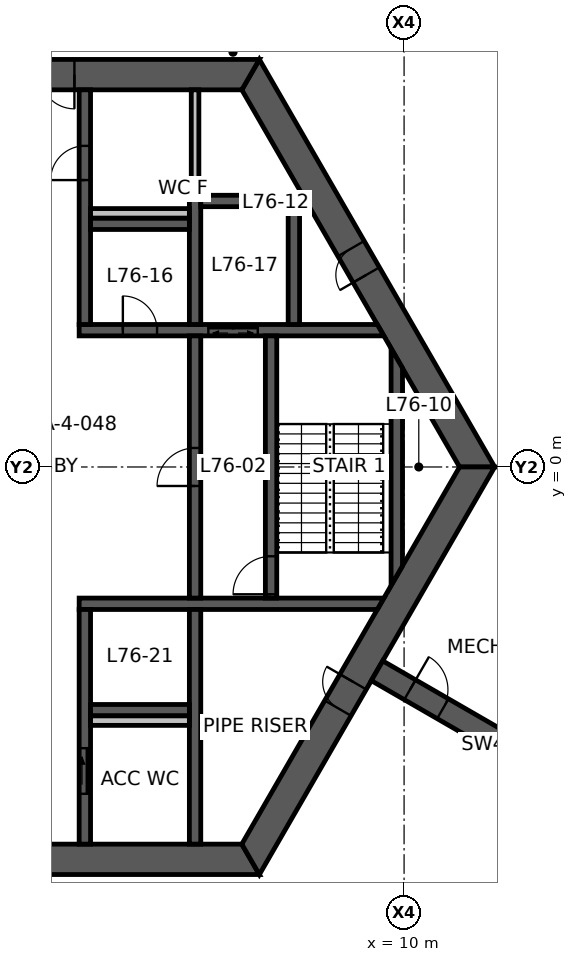
"""IFC4 building model, lengths in metres.
Left out: names, types, materials, properties, quantities, classifications, styles, units other than length and angle.
Written with IfcOpenShell. Run it as: python <this file> out.ifc"""

import sys

from ifc_helpers import new_model, si_unit, direction, frame, frame_2d, origin, place, context, subcontext, project, spatial, polyline, rectangle, outline, extrude, element, fill, save


model = new_model("IFC4")
c1 = context("Model", 3, precision=1e-05, world=origin(), true_north=direction((0.0, 1.0)))
c2 = subcontext(c1, "Body", "Model", "MODEL_VIEW")
j1 = project(units=[si_unit("LENGTHUNIT", "METRE"), si_unit("PLANEANGLEUNIT", "RADIAN")], contexts=[c1])
p1 = place(None, origin())
s1 = spatial("IfcSite", under=j1, at=p1, CompositionType="ELEMENT")
p2 = place(p1, origin())
s2 = spatial("IfcBuilding", under=s1, at=p2, CompositionType="ELEMENT")
p3 = place(p2, frame((0.0, 0.0, 302.5)))
s3 = spatial("IfcBuildingStorey", under=s2, at=p3, CompositionType="ELEMENT", Elevation=302.5)
p4 = place(p3, frame((11.922, 0.0, 0.0), z_axis=(0.0, 0.0, 1.0), x_axis=(-0.500004296715, 0.866022923061, 0.0)))
e1 = element("IfcWall", 1, at=p4, inside=s3, PredefinedType="SHEAR", context=c2, shape_type="SweptSolid", body=[
    extrude(outline(polyline([(-0.231, -0.4), (5.835, -0.4), (6.635, -0.4), (12.153, -0.4), (11.691, 0.4), (6.635, 0.4), (5.835, 0.4), (0.231, 0.4), (-0.231, -0.4)])), origin(), (0.0, 0.0, 1.0), 5.0),
])
p5 = place(p4, frame((5.835, 0.0, 0.0)))
e2 = element("IfcOpeningElement", 2, at=p5, cuts=e1, PredefinedType="OPENING", context=c2, shape_type="SweptSolid", body=[
    extrude(rectangle(XDim=0.8, YDim=2.1, at=frame_2d((0.4, 1.05))), frame((0.0, 0.41, 0.0), z_axis=(0.0, -1.0, 0.0), x_axis=(1.0, 0.0, 0.0)), (0.0, 0.0, 1.0), 0.82),
])
p6 = place(p3, frame((5.961, 10.325, 0.0), z_axis=(0.0, 0.0, 1.0), x_axis=(-1.0, 0.0, 0.0)))
e3 = element("IfcWall", 3, at=p6, inside=s3, PredefinedType="SHEAR", context=c2, shape_type="SweptSolid", body=[
    extrude(outline(polyline([(-0.231, -0.4), (4.636, -0.4), (5.536, -0.4), (6.386, -0.4), (7.286, -0.4), (12.153, -0.4), (11.691, 0.4), (7.286, 0.4), (6.386, 0.4), (5.536, 0.4), (4.636, 0.4), (0.231, 0.4), (-0.231, -0.4)])), origin(), (0.0, 0.0, 1.0), 5.0),
])
p7 = place(p6, frame((6.386, 0.0, 0.0)))
e4 = element("IfcOpeningElement", 4, at=p7, cuts=e3, PredefinedType="OPENING", context=c2, shape_type="SweptSolid", body=[
    extrude(rectangle(XDim=0.9, YDim=2.1, at=frame_2d((0.45, 1.05))), frame((0.0, 0.41, 0.0), z_axis=(0.0, -1.0, 0.0), x_axis=(1.0, 0.0, 0.0)), (0.0, 0.0, 1.0), 0.82),
])
p8 = place(p6, frame((4.636, 0.0, 0.0)))
e5 = element("IfcOpeningElement", 5, at=p8, cuts=e3, PredefinedType="OPENING", context=c2, shape_type="SweptSolid", body=[
    extrude(rectangle(XDim=0.9, YDim=2.1, at=frame_2d((0.45, 1.05))), frame((0.0, 0.41, 0.0), z_axis=(0.0, -1.0, 0.0), x_axis=(1.0, 0.0, 0.0)), (0.0, 0.0, 1.0), 0.82),
])
p9 = place(p3, frame((-5.961, -10.325, 0.0), z_axis=(0.0, 0.0, 1.0), x_axis=(1.0, 0.0, 0.0)))
e6 = element("IfcWall", 6, at=p9, inside=s3, PredefinedType="SHEAR", context=c2, shape_type="SweptSolid", body=[
    extrude(outline(polyline([(-0.231, -0.4), (5.461, -0.4), (6.461, -0.4), (12.153, -0.4), (11.691, 0.4), (6.461, 0.4), (5.461, 0.4), (0.231, 0.4), (-0.231, -0.4)])), origin(), (0.0, 0.0, 1.0), 5.0),
])
p10 = place(p9, frame((5.461, 0.0, 0.0)))
e7 = element("IfcOpeningElement", 7, at=p10, cuts=e6, PredefinedType="OPENING", context=c2, shape_type="SweptSolid", body=[
    extrude(rectangle(XDim=1.0, YDim=2.1, at=frame_2d((0.5, 1.05))), frame((0.0, 0.41, 0.0), z_axis=(0.0, -1.0, 0.0), x_axis=(1.0, 0.0, 0.0)), (0.0, 0.0, 1.0), 0.82),
])
p11 = place(p3, frame((5.961, -10.325, 0.0), z_axis=(0.0, 0.0, 1.0), x_axis=(0.500004296715, 0.866022923061, 0.0)))
e8 = element("IfcWall", 8, at=p11, inside=s3, PredefinedType="SHEAR", context=c2, shape_type="SweptSolid", body=[
    extrude(outline(polyline([(-0.231, -0.4), (4.594, -0.4), (5.394, -0.4), (12.153, -0.4), (11.691, 0.4), (5.394, 0.4), (4.594, 0.4), (0.231, 0.4), (-0.231, -0.4)])), origin(), (0.0, 0.0, 1.0), 5.0),
])
p12 = place(p11, frame((4.594, 0.0, 0.0)))
e9 = element("IfcOpeningElement", 9, at=p12, cuts=e8, PredefinedType="OPENING", context=c2, shape_type="SweptSolid", body=[
    extrude(rectangle(XDim=0.8, YDim=2.1, at=frame_2d((0.4, 1.05))), frame((0.0, 0.41, 0.0), z_axis=(0.0, -1.0, 0.0), x_axis=(1.0, 0.0, 0.0)), (0.0, 0.0, 1.0), 0.82),
])
p13 = place(p3, frame((9.288, -5.363, 0.0), z_axis=(0.0, 0.0, 1.0), x_axis=(0.866031736626, -0.499989031036, 0.0)))
e10 = element("IfcWall", 10, at=p13, inside=s3, PredefinedType="SHEAR", context=c2, shape_type="SweptSolid", body=[
    extrude(rectangle(XDim=7.796, YDim=0.6, at=frame_2d((3.898, 0.0))), origin(), (0.0, 0.0, 1.0), 5.0),
])
p14 = place(p13, frame((1.0, 0.0, 0.0)))
e11 = element("IfcOpeningElement", 11, at=p14, cuts=e10, PredefinedType="OPENING", context=c2, shape_type="SweptSolid", body=[
    extrude(rectangle(XDim=1.0, YDim=2.1, at=frame_2d((0.5, 1.05))), frame((0.0, 0.31, 0.0), z_axis=(0.0, -1.0, 0.0), x_axis=(1.0, 0.0, 0.0)), (0.0, 0.0, 1.0), 0.62),
])
p15 = place(p3, frame((20.389, 0.526, 0.0), z_axis=(0.0, 0.0, 1.0), x_axis=(-0.499993861681, 0.866028947716, 0.0)))
e12 = element("IfcWall", 12, at=p15, inside=s3, PredefinedType="ELEMENTEDWALL", context=c2, shape_type="SweptSolid", body=[
    extrude(rectangle(XDim=19.986, YDim=0.2, at=frame_2d((9.993, 0.0))), origin(), (0.0, 0.0, 1.0), 5.0),
])
p16 = place(p15, frame((0.9, 0.0, 0.4)))
e13 = element("IfcOpeningElement", 13, at=p16, cuts=e12, PredefinedType="OPENING", context=c2, shape_type="SweptSolid", body=[
    extrude(rectangle(XDim=2.531, YDim=4.2, at=frame_2d((1.266, 2.1))), frame((0.0, 0.11, 0.0), z_axis=(0.0, -1.0, 0.0), x_axis=(1.0, 0.0, 0.0)), (0.0, 0.0, 1.0), 0.22),
])
p17 = place(p15, frame((4.031, 0.0, 0.4)))
e14 = element("IfcOpeningElement", 14, at=p17, cuts=e12, PredefinedType="OPENING", context=c2, shape_type="SweptSolid", body=[
    extrude(rectangle(XDim=2.531, YDim=4.2, at=frame_2d((1.266, 2.1))), frame((0.0, 0.11, 0.0), z_axis=(0.0, -1.0, 0.0), x_axis=(1.0, 0.0, 0.0)), (0.0, 0.0, 1.0), 0.22),
])
p18 = place(p15, frame((13.424, 0.0, 0.4)))
e15 = element("IfcOpeningElement", 15, at=p18, cuts=e12, PredefinedType="OPENING", context=c2, shape_type="SweptSolid", body=[
    extrude(rectangle(XDim=2.531, YDim=4.2, at=frame_2d((1.266, 2.1))), frame((0.0, 0.11, 0.0), z_axis=(0.0, -1.0, 0.0), x_axis=(1.0, 0.0, 0.0)), (0.0, 0.0, 1.0), 0.22),
])
p19 = place(p15, frame((16.555, 0.0, 0.4)))
e16 = element("IfcOpeningElement", 16, at=p19, cuts=e12, PredefinedType="OPENING", context=c2, shape_type="SweptSolid", body=[
    extrude(rectangle(XDim=2.531, YDim=4.2, at=frame_2d((1.266, 2.1))), frame((0.0, 0.11, 0.0), z_axis=(0.0, -1.0, 0.0), x_axis=(1.0, 0.0, 0.0)), (0.0, 0.0, 1.0), 0.22),
])
p20 = place(p3, frame((1.45, 3.6, 0.0), z_axis=(0.0, 0.0, 1.0), x_axis=(1.0, 0.0, 0.0)))
e17 = element("IfcWall", 17, at=p20, inside=s3, PredefinedType="SHEAR", context=c2, shape_type="SweptSolid", body=[
    extrude(outline(polyline([(0.0, -0.15), (1.15, -0.15), (2.05, -0.15), (3.4, -0.15), (4.7, -0.15), (8.019, -0.15), (7.845, 0.15), (4.7, 0.15), (3.4, 0.15), (2.05, 0.15), (1.15, 0.15), (0.0, 0.15), (0.0, -0.15)])), origin(), (0.0, 0.0, 1.0), 5.0),
])
p21 = place(p20, frame((1.15, 0.0, 0.0)))
e18 = element("IfcOpeningElement", 18, at=p21, cuts=e17, PredefinedType="OPENING", context=c2, shape_type="SweptSolid", body=[
    extrude(rectangle(XDim=0.9, YDim=2.1, at=frame_2d((0.45, 1.05))), frame((0.0, 0.16, 0.0), z_axis=(0.0, -1.0, 0.0), x_axis=(1.0, 0.0, 0.0)), (0.0, 0.0, 1.0), 0.32),
])
p22 = place(p20, frame((3.4, 0.0, 0.0)))
e19 = element("IfcOpeningElement", 19, at=p22, cuts=e17, PredefinedType="OPENING", context=c2, shape_type="SweptSolid", body=[
    extrude(rectangle(XDim=1.3, YDim=2.1, at=frame_2d((0.65, 1.05))), frame((0.0, 0.16, 0.0), z_axis=(0.0, -1.0, 0.0), x_axis=(1.0, 0.0, 0.0)), (0.0, 0.0, 1.0), 0.32),
])
p23 = place(p3, frame((1.45, -3.6, 0.0), z_axis=(0.0, 0.0, 1.0), x_axis=(1.0, 0.0, 0.0)))
e20 = element("IfcWall", 20, at=p23, inside=s3, PredefinedType="SHEAR", context=c2, shape_type="SweptSolid", body=[
    extrude(outline(polyline([(0.0, -0.15), (7.845, -0.15), (8.019, 0.15), (0.0, 0.15), (0.0, -0.15)])), origin(), (0.0, 0.0, 1.0), 5.0),
])
p24 = place(p3, frame((1.6, 3.75, 0.0), z_axis=(0.0, 0.0, 1.0), x_axis=(0.0, 1.0, 0.0)))
e21 = element("IfcWall", 21, at=p24, inside=s3, PredefinedType="SHEAR", context=c2, shape_type="SweptSolid", body=[
    extrude(rectangle(XDim=6.175, YDim=0.3, at=frame_2d((3.087, 0.0))), origin(), (0.0, 0.0, 1.0), 5.0),
])
p25 = place(p24, frame((3.8, 0.0, 0.0)))
e22 = element("IfcOpeningElement", 22, at=p25, cuts=e21, PredefinedType="OPENING", context=c2, shape_type="SweptSolid", body=[
    extrude(rectangle(XDim=0.9, YDim=2.1, at=frame_2d((0.45, 1.05))), frame((0.0, 0.16, 0.0), z_axis=(0.0, -1.0, 0.0), x_axis=(1.0, 0.0, 0.0)), (0.0, 0.0, 1.0), 0.32),
])
p26 = place(p3, frame((1.6, -3.75, 0.0), z_axis=(0.0, 0.0, 1.0), x_axis=(0.0, -1.0, 0.0)))
e23 = element("IfcWall", 23, at=p26, inside=s3, PredefinedType="SHEAR", context=c2, shape_type="SweptSolid", body=[
    extrude(rectangle(XDim=6.175, YDim=0.3, at=frame_2d((3.087, 0.0))), origin(), (0.0, 0.0, 1.0), 5.0),
])
p27 = place(p26, frame((3.65, 0.0, 0.0)))
e24 = element("IfcOpeningElement", 24, at=p27, cuts=e23, PredefinedType="OPENING", context=c2, shape_type="SweptSolid", body=[
    extrude(rectangle(XDim=1.2, YDim=2.1, at=frame_2d((0.6, 1.05))), frame((0.0, 0.16, 0.0), z_axis=(0.0, -1.0, 0.0), x_axis=(1.0, 0.0, 0.0)), (0.0, 0.0, 1.0), 0.32),
])
p28 = place(p3, frame((4.5, -3.45, 0.0), z_axis=(0.0, 0.0, 1.0), x_axis=(0.0, 1.0, 0.0)))
e25 = element("IfcWall", 25, at=p28, inside=s3, PredefinedType="SHEAR", context=c2, shape_type="SweptSolid", body=[
    extrude(rectangle(XDim=6.9, YDim=0.3, at=frame_2d((3.45, 0.0))), origin(), (0.0, 0.0, 1.0), 5.0),
])
p29 = place(p28, frame((2.95, 0.0, 0.0)))
e26 = element("IfcOpeningElement", 26, at=p29, cuts=e25, PredefinedType="OPENING", context=c2, shape_type="SweptSolid", body=[
    extrude(rectangle(XDim=1.0, YDim=2.1, at=frame_2d((0.5, 1.05))), frame((0.0, 0.16, 0.0), z_axis=(0.0, -1.0, 0.0), x_axis=(1.0, 0.0, 0.0)), (0.0, 0.0, 1.0), 0.32),
])
p30 = place(p3, frame((6.5, -3.45, 0.0), z_axis=(0.0, 0.0, 1.0), x_axis=(0.0, 1.0, 0.0)))
e27 = element("IfcWall", 27, at=p30, inside=s3, PredefinedType="SHEAR", context=c2, shape_type="SweptSolid", body=[
    extrude(rectangle(XDim=6.9, YDim=0.3, at=frame_2d((3.45, 0.0))), origin(), (0.0, 0.0, 1.0), 5.0),
])
p31 = place(p30, frame((0.1, 0.0, 0.0)))
e28 = element("IfcOpeningElement", 28, at=p31, cuts=e27, PredefinedType="OPENING", context=c2, shape_type="SweptSolid", body=[
    extrude(rectangle(XDim=1.0, YDim=2.1, at=frame_2d((0.5, 1.05))), frame((0.0, 0.16, 0.0), z_axis=(0.0, -1.0, 0.0), x_axis=(1.0, 0.0, 0.0)), (0.0, 0.0, 1.0), 0.32),
])
p32 = place(p3, frame((4.5, 3.75, 0.0), z_axis=(0.0, 0.0, 1.0), x_axis=(0.0, 1.0, 0.0)))
e29 = element("IfcWall", 29, at=p32, inside=s3, PredefinedType="SHEAR", context=c2, shape_type="SweptSolid", body=[
    extrude(rectangle(XDim=3.4, YDim=0.3, at=frame_2d((1.7, 0.0))), origin(), (0.0, 0.0, 1.0), 5.0),
])
p33 = place(p3, frame((4.5, -3.75, 0.0), z_axis=(0.0, 0.0, 1.0), x_axis=(0.0, -1.0, 0.0)))
e30 = element("IfcWall", 30, at=p33, inside=s3, PredefinedType="SHEAR", context=c2, shape_type="SweptSolid", body=[
    extrude(rectangle(XDim=6.175, YDim=0.3, at=frame_2d((3.087, 0.0))), origin(), (0.0, 0.0, 1.0), 5.0),
])
for number, where, z_axis, x_axis in (
    (31, (1.75, 6.4, 0.0), (0.0, 0.0, 1.0), (1.0, 0.0, 0.0)),
    (32, (1.75, -6.4, 0.0), (0.0, 0.0, 1.0), (1.0, 0.0, 0.0)),
    (33, (4.65, 7.0, 0.0), (0.0, 0.0, 1.0), (1.0, 0.0, 0.0)),
):
    element("IfcWall", number, at=place(p3, frame(where, z_axis=z_axis, x_axis=x_axis)), inside=s3, PredefinedType="SHEAR", context=c2, shape_type="SweptSolid", body=[
        extrude(rectangle(XDim=2.6, YDim=0.3, at=frame_2d((1.3, 0.0))), origin(), (0.0, 0.0, 1.0), 5.0),
    ])
p34 = place(p3, frame((7.1, 3.75, 0.0), z_axis=(0.0, 0.0, 1.0), x_axis=(0.0, 1.0, 0.0)))
e34 = element("IfcWall", 34, at=p34, inside=s3, PredefinedType="SHEAR", context=c2, shape_type="SweptSolid", body=[
    extrude(rectangle(XDim=3.1, YDim=0.3, at=frame_2d((1.55, 0.0))), origin(), (0.0, 0.0, 1.0), 5.0),
])
p35 = place(p3, frame((9.808, -2.862, 0.0), z_axis=(0.0, 0.0, 1.0), x_axis=(0.0, 1.0, 0.0)))
e35 = element("IfcWall", 35, at=p35, inside=s3, PredefinedType="SHEAR", context=c2, shape_type="SweptSolid", body=[
    extrude(outline(polyline([(0.26, -0.15), (5.465, -0.15), (5.984, 0.15), (-0.26, 0.15), (0.26, -0.15)])), origin(), (0.0, 0.0, 1.0), 5.0),
])
p36 = place(p3, frame((4.5, 7.15, 0.0), z_axis=(0.0, 0.0, 1.0), x_axis=(0.0, 1.0, 0.0)))
e36 = element("IfcWall", 36, at=p36, inside=s3, PredefinedType="STANDARD", context=c2, shape_type="SweptSolid", body=[
    extrude(rectangle(XDim=2.775, YDim=0.2, at=frame_2d((1.388, 0.0))), origin(), (0.0, 0.0, 1.0), 5.0),
])
for number, where, z_axis, x_axis in (
    (37, (1.75, 6.675, 0.0), (0.0, 0.0, 1.0), (1.0, 0.0, 0.0)),
    (38, (1.75, -6.675, 0.0), (0.0, 0.0, 1.0), (1.0, 0.0, 0.0)),
):
    element("IfcWall", number, at=place(p3, frame(where, z_axis=z_axis, x_axis=x_axis)), inside=s3, PredefinedType="PLUMBINGWALL", context=c2, shape_type="SweptSolid", body=[
        extrude(rectangle(XDim=2.6, YDim=0.25, at=frame_2d((1.3, 0.0))), origin(), (0.0, 0.0, 1.0), 5.0),
    ])
p37 = place(p3, frame((6.5, -3.75, 5.0), z_axis=(0.0, 0.0, 1.0), x_axis=(0.0, 1.0, 0.0)))
e39 = element("IfcWall", 39, at=p37, inside=s3, PredefinedType="STANDARD", context=c2, shape_type="SweptSolid", body=[
    extrude(rectangle(XDim=7.5, YDim=0.3, at=frame_2d((3.75, 0.0))), origin(), (0.0, 0.0, 1.0), 2.45),
])
p38 = place(p37, frame((0.45, 0.0, 0.0)))
e40 = element("IfcOpeningElement", 40, at=p38, cuts=e39, PredefinedType="OPENING", context=c2, shape_type="SweptSolid", body=[
    extrude(rectangle(XDim=0.9, YDim=2.1, at=frame_2d((0.45, 1.05))), frame((0.0, 0.16, 0.0), z_axis=(0.0, -1.0, 0.0), x_axis=(1.0, 0.0, 0.0)), (0.0, 0.0, 1.0), 0.32),
])
for number, where, z_axis, x_axis in (
    (41, (6.65, -3.6, 5.0), (0.0, 0.0, 1.0), (1.0, 0.0, 0.0)),
    (42, (6.65, 3.6, 5.0), (0.0, 0.0, 1.0), (1.0, 0.0, 0.0)),
):
    element("IfcWall", number, at=place(p3, frame(where, z_axis=z_axis, x_axis=x_axis)), inside=s3, PredefinedType="STANDARD", context=c2, shape_type="SweptSolid", body=[
        extrude(rectangle(XDim=3.008, YDim=0.3, at=frame_2d((1.504, 0.0))), origin(), (0.0, 0.0, 1.0), 2.45),
    ])
p39 = place(p3, frame((9.808, -3.75, 5.0), z_axis=(0.0, 0.0, 1.0), x_axis=(0.0, 1.0, 0.0)))
e43 = element("IfcWall", 43, at=p39, inside=s3, PredefinedType="STANDARD", context=c2, shape_type="SweptSolid", body=[
    extrude(rectangle(XDim=7.5, YDim=0.3, at=frame_2d((3.75, 0.0))), origin(), (0.0, 0.0, 1.0), 2.45),
])
p40 = place(p8, origin())
e44 = element("IfcDoor", 44, at=p40, inside=s3, OperationType="SINGLE_SWING_LEFT", PredefinedType="DOOR", context=c2, shape_type="SweptSolid", body=[
    extrude(rectangle(XDim=0.9, YDim=2.1, at=frame_2d((0.45, 1.05))), frame((0.0, 0.025, 0.0), z_axis=(0.0, -1.0, 0.0), x_axis=(1.0, 0.0, 0.0)), (0.0, 0.0, 1.0), 0.05),
])
fill(e5, e44)
p41 = place(p5, origin())
e45 = element("IfcDoor", 45, at=p41, inside=s3, OperationType="SINGLE_SWING_LEFT", PredefinedType="DOOR", context=c2, shape_type="SweptSolid", body=[
    extrude(rectangle(XDim=0.8, YDim=2.1, at=frame_2d((0.4, 1.05))), frame((0.0, 0.025, 0.0), z_axis=(0.0, -1.0, 0.0), x_axis=(1.0, 0.0, 0.0)), (0.0, 0.0, 1.0), 0.05),
])
fill(e2, e45)
p42 = place(p12, origin())
e46 = element("IfcDoor", 46, at=p42, inside=s3, OperationType="SINGLE_SWING_RIGHT", PredefinedType="DOOR", context=c2, shape_type="SweptSolid", body=[
    extrude(rectangle(XDim=0.8, YDim=2.1, at=frame_2d((0.4, 1.05))), frame((0.0, 0.025, 0.0), z_axis=(0.0, -1.0, 0.0), x_axis=(1.0, 0.0, 0.0)), (0.0, 0.0, 1.0), 0.05),
])
fill(e9, e46)
p43 = place(p29, origin())
e47 = element("IfcDoor", 47, at=p43, inside=s3, OperationType="SINGLE_SWING_LEFT", PredefinedType="DOOR", context=c2, shape_type="SweptSolid", body=[
    extrude(rectangle(XDim=1.0, YDim=2.1, at=frame_2d((0.5, 1.05))), frame((0.0, 0.025, 0.0), z_axis=(0.0, -1.0, 0.0), x_axis=(1.0, 0.0, 0.0)), (0.0, 0.0, 1.0), 0.05),
])
fill(e26, e47)
p44 = place(p31, origin())
e48 = element("IfcDoor", 48, at=p44, inside=s3, OperationType="SINGLE_SWING_LEFT", PredefinedType="DOOR", context=c2, shape_type="SweptSolid", body=[
    extrude(rectangle(XDim=1.0, YDim=2.1, at=frame_2d((0.5, 1.05))), frame((0.0, 0.025, 0.0), z_axis=(0.0, -1.0, 0.0), x_axis=(1.0, 0.0, 0.0)), (0.0, 0.0, 1.0), 0.05),
])
fill(e28, e48)
p45 = place(p25, origin())
e49 = element("IfcDoor", 49, at=p45, inside=s3, OperationType="SINGLE_SWING_LEFT", PredefinedType="DOOR", context=c2, shape_type="SweptSolid", body=[
    extrude(rectangle(XDim=0.9, YDim=2.1, at=frame_2d((0.45, 1.05))), frame((0.0, 0.025, 0.0), z_axis=(0.0, -1.0, 0.0), x_axis=(1.0, 0.0, 0.0)), (0.0, 0.0, 1.0), 0.05),
])
fill(e22, e49)
p46 = place(p27, origin())
e50 = element("IfcDoor", 50, at=p46, inside=s3, OperationType="SLIDING_TO_LEFT", PredefinedType="DOOR", context=c2, shape_type="SweptSolid", body=[
    extrude(rectangle(XDim=1.2, YDim=2.1, at=frame_2d((0.6, 1.05))), frame((0.0, 0.025, 0.0), z_axis=(0.0, -1.0, 0.0), x_axis=(1.0, 0.0, 0.0)), (0.0, 0.0, 1.0), 0.05),
])
fill(e24, e50)
p47 = place(p21, origin())
e51 = element("IfcDoor", 51, at=p47, inside=s3, OperationType="SINGLE_SWING_LEFT", PredefinedType="DOOR", context=c2, shape_type="SweptSolid", body=[
    extrude(rectangle(XDim=0.9, YDim=2.1, at=frame_2d((0.45, 1.05))), frame((0.0, 0.025, 0.0), z_axis=(0.0, -1.0, 0.0), x_axis=(1.0, 0.0, 0.0)), (0.0, 0.0, 1.0), 0.05),
])
fill(e18, e51)
p48 = place(p14, origin())
e52 = element("IfcDoor", 52, at=p48, inside=s3, OperationType="SINGLE_SWING_LEFT", PredefinedType="DOOR", context=c2, shape_type="SweptSolid", body=[
    extrude(rectangle(XDim=1.0, YDim=2.1, at=frame_2d((0.5, 1.05))), frame((0.0, 0.025, 0.0), z_axis=(0.0, -1.0, 0.0), x_axis=(1.0, 0.0, 0.0)), (0.0, 0.0, 1.0), 0.05),
])
fill(e11, e52)
p49 = place(p22, origin())
e53 = element("IfcDoor", 53, at=p49, inside=s3, OperationType="DOUBLE_DOOR_SLIDING", PredefinedType="DOOR", context=c2, shape_type="SweptSolid", body=[
    extrude(rectangle(XDim=1.3, YDim=2.1, at=frame_2d((0.65, 1.05))), frame((0.0, 0.025, 0.0), z_axis=(0.0, -1.0, 0.0), x_axis=(1.0, 0.0, 0.0)), (0.0, 0.0, 1.0), 0.05),
])
fill(e19, e53)
p50 = place(p38, origin())
e54 = element("IfcDoor", 54, at=p50, inside=s3, OperationType="SINGLE_SWING_LEFT", PredefinedType="DOOR", context=c2, shape_type="SweptSolid", body=[
    extrude(rectangle(XDim=0.9, YDim=2.1, at=frame_2d((0.45, 1.05))), frame((0.0, 0.025, 0.0), z_axis=(0.0, -1.0, 0.0), x_axis=(1.0, 0.0, 0.0)), (0.0, 0.0, 1.0), 0.05),
])
fill(e40, e54)
save(model, sys.argv[1])
